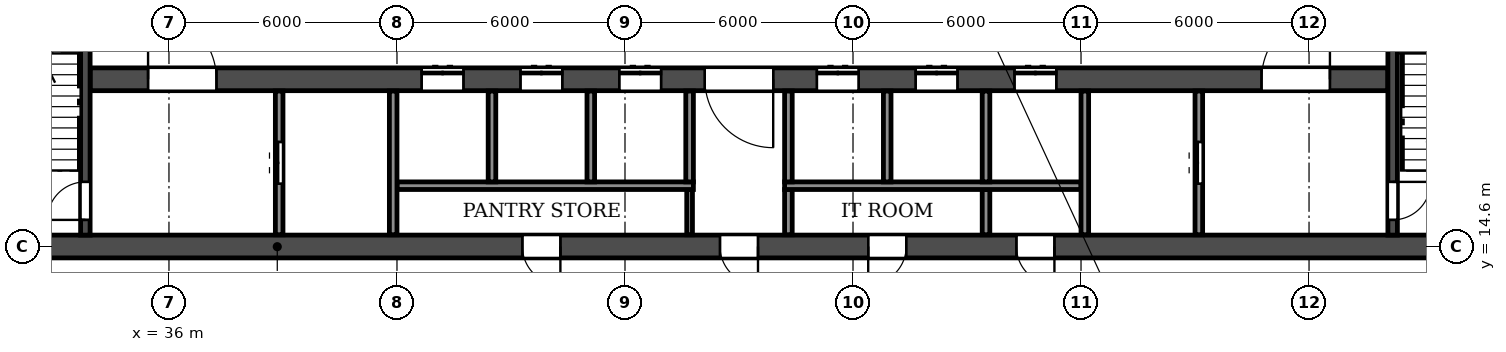
"""IFC4 building model, lengths in metres.
Left out: names, types, materials, properties, quantities, classifications, styles, units other than length and angle.
Written with IfcOpenShell. Run it as: python <this file> out.ifc"""

import sys

from ifc_helpers import new_model, si_unit, direction, frame, frame_2d, origin, place, context, subcontext, project, spatial, rectangle, extrude, element, fill, save


model = new_model("IFC4")
c1 = context("Model", 3, precision=1e-05, world=origin(), true_north=direction((0.0, 1.0)))
c2 = subcontext(c1, "Body", "Model", "MODEL_VIEW")
j1 = project(units=[si_unit("LENGTHUNIT", "METRE"), si_unit("PLANEANGLEUNIT", "RADIAN")], contexts=[c1])
p1 = place(None, origin())
s1 = spatial("IfcSite", under=j1, at=p1, CompositionType="ELEMENT")
p2 = place(p1, origin())
s2 = spatial("IfcBuilding", under=s1, at=p2, CompositionType="ELEMENT")
p3 = place(p2, frame((0.0, 0.0, 43.2)))
s3 = spatial("IfcBuildingStorey", under=s2, at=p3, CompositionType="ELEMENT", Elevation=43.2)
p4 = place(p3, frame((2.6, 14.6, 0.0), z_axis=(0.0, 0.0, 1.0), x_axis=(1.0, 0.0, 0.0)))
e1 = element("IfcWall", 1, at=p4, inside=s3, PredefinedType="SOLIDWALL", context=c2, shape_type="SweptSolid", body=[
    extrude(rectangle(XDim=96.8, YDim=0.6, at=frame_2d((48.4, 0.0))), origin(), (0.0, 0.0, 1.0), 3.05),
])
p5 = place(p4, frame((3.05, 0.0, 0.0)))
e2 = element("IfcOpeningElement", 2, at=p5, cuts=e1, PredefinedType="OPENING", context=c2, shape_type="SweptSolid", body=[
    extrude(rectangle(XDim=1.5, YDim=2.1, at=frame_2d((0.75, 1.05))), frame((0.0, 0.31, 0.0), z_axis=(0.0, -1.0, 0.0), x_axis=(1.0, 0.0, 0.0)), (0.0, 0.0, 1.0), 0.62),
])
p6 = place(p4, frame((10.75, 0.0, 0.0)))
e3 = element("IfcOpeningElement", 3, at=p6, cuts=e1, PredefinedType="OPENING", context=c2, shape_type="SweptSolid", body=[
    extrude(rectangle(XDim=1.5, YDim=2.1, at=frame_2d((0.75, 1.05))), frame((0.0, 0.31, 0.0), z_axis=(0.0, -1.0, 0.0), x_axis=(1.0, 0.0, 0.0)), (0.0, 0.0, 1.0), 0.62),
])
p7 = place(p4, frame((16.3, 0.0, 0.0)))
e4 = element("IfcOpeningElement", 4, at=p7, cuts=e1, PredefinedType="OPENING", context=c2, shape_type="SweptSolid", body=[
    extrude(rectangle(XDim=1.0, YDim=2.1, at=frame_2d((0.5, 1.05))), frame((0.0, 0.31, 0.0), z_axis=(0.0, -1.0, 0.0), x_axis=(1.0, 0.0, 0.0)), (0.0, 0.0, 1.0), 0.62),
])
p8 = place(p4, frame((24.2, 0.0, 0.0)))
e5 = element("IfcOpeningElement", 5, at=p8, cuts=e1, PredefinedType="OPENING", context=c2, shape_type="SweptSolid", body=[
    extrude(rectangle(XDim=1.0, YDim=2.1, at=frame_2d((0.5, 1.05))), frame((0.0, 0.31, 0.0), z_axis=(0.0, -1.0, 0.0), x_axis=(1.0, 0.0, 0.0)), (0.0, 0.0, 1.0), 0.62),
])
p9 = place(p4, frame((28.8, 0.0, 0.0)))
e6 = element("IfcOpeningElement", 6, at=p9, cuts=e1, PredefinedType="OPENING", context=c2, shape_type="SweptSolid", body=[
    extrude(rectangle(XDim=1.0, YDim=2.1, at=frame_2d((0.5, 1.05))), frame((0.0, 0.31, 0.0), z_axis=(0.0, -1.0, 0.0), x_axis=(1.0, 0.0, 0.0)), (0.0, 0.0, 1.0), 0.62),
])
p10 = place(p4, frame((42.7, 0.0, 0.0)))
e7 = element("IfcOpeningElement", 7, at=p10, cuts=e1, PredefinedType="OPENING", context=c2, shape_type="SweptSolid", body=[
    extrude(rectangle(XDim=1.0, YDim=2.1, at=frame_2d((0.5, 1.05))), frame((0.0, 0.31, 0.0), z_axis=(0.0, -1.0, 0.0), x_axis=(1.0, 0.0, 0.0)), (0.0, 0.0, 1.0), 0.62),
])
p11 = place(p4, frame((47.9, 0.0, 0.0)))
e8 = element("IfcOpeningElement", 8, at=p11, cuts=e1, PredefinedType="OPENING", context=c2, shape_type="SweptSolid", body=[
    extrude(rectangle(XDim=1.0, YDim=2.1, at=frame_2d((0.5, 1.05))), frame((0.0, 0.31, 0.0), z_axis=(0.0, -1.0, 0.0), x_axis=(1.0, 0.0, 0.0)), (0.0, 0.0, 1.0), 0.62),
])
p12 = place(p4, frame((51.8, 0.0, 0.0)))
e9 = element("IfcOpeningElement", 9, at=p12, cuts=e1, PredefinedType="OPENING", context=c2, shape_type="SweptSolid", body=[
    extrude(rectangle(XDim=1.0, YDim=2.1, at=frame_2d((0.5, 1.05))), frame((0.0, 0.31, 0.0), z_axis=(0.0, -1.0, 0.0), x_axis=(1.0, 0.0, 0.0)), (0.0, 0.0, 1.0), 0.62),
])
p13 = place(p4, frame((55.7, 0.0, 0.0)))
e10 = element("IfcOpeningElement", 10, at=p13, cuts=e1, PredefinedType="OPENING", context=c2, shape_type="SweptSolid", body=[
    extrude(rectangle(XDim=1.0, YDim=2.1, at=frame_2d((0.5, 1.05))), frame((0.0, 0.31, 0.0), z_axis=(0.0, -1.0, 0.0), x_axis=(1.0, 0.0, 0.0)), (0.0, 0.0, 1.0), 0.62),
])
p14 = place(p4, frame((67.0, 0.0, 0.0)))
e11 = element("IfcOpeningElement", 11, at=p14, cuts=e1, PredefinedType="OPENING", context=c2, shape_type="SweptSolid", body=[
    extrude(rectangle(XDim=1.0, YDim=2.1, at=frame_2d((0.5, 1.05))), frame((0.0, 0.31, 0.0), z_axis=(0.0, -1.0, 0.0), x_axis=(1.0, 0.0, 0.0)), (0.0, 0.0, 1.0), 0.62),
])
p15 = place(p4, frame((71.6, 0.0, 0.0)))
e12 = element("IfcOpeningElement", 12, at=p15, cuts=e1, PredefinedType="OPENING", context=c2, shape_type="SweptSolid", body=[
    extrude(rectangle(XDim=1.0, YDim=2.1, at=frame_2d((0.5, 1.05))), frame((0.0, 0.31, 0.0), z_axis=(0.0, -1.0, 0.0), x_axis=(1.0, 0.0, 0.0)), (0.0, 0.0, 1.0), 0.62),
])
p16 = place(p4, frame((79.5, 0.0, 0.0)))
e13 = element("IfcOpeningElement", 13, at=p16, cuts=e1, PredefinedType="OPENING", context=c2, shape_type="SweptSolid", body=[
    extrude(rectangle(XDim=1.0, YDim=2.1, at=frame_2d((0.5, 1.05))), frame((0.0, 0.31, 0.0), z_axis=(0.0, -1.0, 0.0), x_axis=(1.0, 0.0, 0.0)), (0.0, 0.0, 1.0), 0.62),
])
p17 = place(p4, frame((84.05, 0.0, 0.0)))
e14 = element("IfcOpeningElement", 14, at=p17, cuts=e1, PredefinedType="OPENING", context=c2, shape_type="SweptSolid", body=[
    extrude(rectangle(XDim=1.0, YDim=2.1, at=frame_2d((0.5, 1.05))), frame((0.0, 0.31, 0.0), z_axis=(0.0, -1.0, 0.0), x_axis=(1.0, 0.0, 0.0)), (0.0, 0.0, 1.0), 0.62),
])
p18 = place(p4, frame((91.75, 0.0, 0.0)))
e15 = element("IfcOpeningElement", 15, at=p18, cuts=e1, PredefinedType="OPENING", context=c2, shape_type="SweptSolid", body=[
    extrude(rectangle(XDim=1.0, YDim=2.1, at=frame_2d((0.5, 1.05))), frame((0.0, 0.31, 0.0), z_axis=(0.0, -1.0, 0.0), x_axis=(1.0, 0.0, 0.0)), (0.0, 0.0, 1.0), 0.62),
])
p19 = place(p3, frame((33.925, 19.0, 0.0), z_axis=(0.0, 0.0, 1.0), x_axis=(1.0, 0.0, 0.0)))
e16 = element("IfcWall", 16, at=p19, inside=s3, PredefinedType="SOLIDWALL", context=c2, shape_type="SweptSolid", body=[
    extrude(rectangle(XDim=34.15, YDim=0.6, at=frame_2d((17.075, 0.0))), origin(), (0.0, 0.0, 1.0), 3.05),
])
p20 = place(p19, frame((16.175, 0.0, 0.0)))
e17 = element("IfcOpeningElement", 17, at=p20, cuts=e16, PredefinedType="OPENING", context=c2, shape_type="SweptSolid", body=[
    extrude(rectangle(XDim=1.8, YDim=2.1, at=frame_2d((0.9, 1.05))), frame((0.0, 0.31, 0.0), z_axis=(0.0, -1.0, 0.0), x_axis=(1.0, 0.0, 0.0)), (0.0, 0.0, 1.0), 0.62),
])
p21 = place(p19, frame((1.525, 0.0, 0.0)))
e18 = element("IfcOpeningElement", 18, at=p21, cuts=e16, PredefinedType="OPENING", context=c2, shape_type="SweptSolid", body=[
    extrude(rectangle(XDim=1.8, YDim=2.1, at=frame_2d((0.9, 1.05))), frame((0.0, 0.31, 0.0), z_axis=(0.0, -1.0, 0.0), x_axis=(1.0, 0.0, 0.0)), (0.0, 0.0, 1.0), 0.62),
])
p22 = place(p19, frame((8.725, 0.0, 0.0)))
e19 = element("IfcOpeningElement", 19, at=p22, cuts=e16, PredefinedType="OPENING", context=c2, shape_type="SweptSolid", body=[
    extrude(rectangle(XDim=1.1, YDim=2.1, at=frame_2d((0.55, 1.05))), frame((0.0, 0.31, 0.0), z_axis=(0.0, -1.0, 0.0), x_axis=(1.0, 0.0, 0.0)), (0.0, 0.0, 1.0), 0.62),
])
p23 = place(p19, frame((11.325, 0.0, 0.0)))
e20 = element("IfcOpeningElement", 20, at=p23, cuts=e16, PredefinedType="OPENING", context=c2, shape_type="SweptSolid", body=[
    extrude(rectangle(XDim=1.1, YDim=2.1, at=frame_2d((0.55, 1.05))), frame((0.0, 0.31, 0.0), z_axis=(0.0, -1.0, 0.0), x_axis=(1.0, 0.0, 0.0)), (0.0, 0.0, 1.0), 0.62),
])
p24 = place(p19, frame((13.925, 0.0, 0.0)))
e21 = element("IfcOpeningElement", 21, at=p24, cuts=e16, PredefinedType="OPENING", context=c2, shape_type="SweptSolid", body=[
    extrude(rectangle(XDim=1.1, YDim=2.1, at=frame_2d((0.55, 1.05))), frame((0.0, 0.31, 0.0), z_axis=(0.0, -1.0, 0.0), x_axis=(1.0, 0.0, 0.0)), (0.0, 0.0, 1.0), 0.62),
])
p25 = place(p19, frame((19.125, 0.0, 0.0)))
e22 = element("IfcOpeningElement", 22, at=p25, cuts=e16, PredefinedType="OPENING", context=c2, shape_type="SweptSolid", body=[
    extrude(rectangle(XDim=1.1, YDim=2.1, at=frame_2d((0.55, 1.05))), frame((0.0, 0.31, 0.0), z_axis=(0.0, -1.0, 0.0), x_axis=(1.0, 0.0, 0.0)), (0.0, 0.0, 1.0), 0.62),
])
p26 = place(p19, frame((21.725, 0.0, 0.0)))
e23 = element("IfcOpeningElement", 23, at=p26, cuts=e16, PredefinedType="OPENING", context=c2, shape_type="SweptSolid", body=[
    extrude(rectangle(XDim=1.1, YDim=2.1, at=frame_2d((0.55, 1.05))), frame((0.0, 0.31, 0.0), z_axis=(0.0, -1.0, 0.0), x_axis=(1.0, 0.0, 0.0)), (0.0, 0.0, 1.0), 0.62),
])
p27 = place(p19, frame((24.325, 0.0, 0.0)))
e24 = element("IfcOpeningElement", 24, at=p27, cuts=e16, PredefinedType="OPENING", context=c2, shape_type="SweptSolid", body=[
    extrude(rectangle(XDim=1.1, YDim=2.1, at=frame_2d((0.55, 1.05))), frame((0.0, 0.31, 0.0), z_axis=(0.0, -1.0, 0.0), x_axis=(1.0, 0.0, 0.0)), (0.0, 0.0, 1.0), 0.62),
])
p28 = place(p19, frame((30.825, 0.0, 0.0)))
e25 = element("IfcOpeningElement", 25, at=p28, cuts=e16, PredefinedType="OPENING", context=c2, shape_type="SweptSolid", body=[
    extrude(rectangle(XDim=1.8, YDim=2.1, at=frame_2d((0.9, 1.05))), frame((0.0, 0.31, 0.0), z_axis=(0.0, -1.0, 0.0), x_axis=(1.0, 0.0, 0.0)), (0.0, 0.0, 1.0), 0.62),
])
p29 = place(p3, frame((33.8, 14.9, 0.0), z_axis=(0.0, 0.0, 1.0), x_axis=(0.0, 1.0, 0.0)))
e26 = element("IfcWall", 26, at=p29, inside=s3, PredefinedType="SOLIDWALL", context=c2, shape_type="SweptSolid", body=[
    extrude(rectangle(XDim=7.575, YDim=0.25, at=frame_2d((3.788, 0.0))), origin(), (0.0, 0.0, 1.0), 3.05),
])
p30 = place(p29, frame((0.4, 0.0, 0.0)))
e27 = element("IfcOpeningElement", 27, at=p30, cuts=e26, PredefinedType="OPENING", context=c2, shape_type="SweptSolid", body=[
    extrude(rectangle(XDim=1.0, YDim=2.1, at=frame_2d((0.5, 1.05))), frame((0.0, 0.135, 0.0), z_axis=(0.0, -1.0, 0.0), x_axis=(1.0, 0.0, 0.0)), (0.0, 0.0, 1.0), 0.27),
])
p31 = place(p3, frame((68.2, 14.9, 0.0), z_axis=(0.0, 0.0, 1.0), x_axis=(0.0, 1.0, 0.0)))
e28 = element("IfcWall", 28, at=p31, inside=s3, PredefinedType="SOLIDWALL", context=c2, shape_type="SweptSolid", body=[
    extrude(rectangle(XDim=7.575, YDim=0.25, at=frame_2d((3.788, 0.0))), origin(), (0.0, 0.0, 1.0), 3.05),
])
p32 = place(p31, frame((0.4, 0.0, 0.0)))
e29 = element("IfcOpeningElement", 29, at=p32, cuts=e28, PredefinedType="OPENING", context=c2, shape_type="SweptSolid", body=[
    extrude(rectangle(XDim=1.0, YDim=2.1, at=frame_2d((0.5, 1.05))), frame((0.0, 0.135, 0.0), z_axis=(0.0, -1.0, 0.0), x_axis=(1.0, 0.0, 0.0)), (0.0, 0.0, 1.0), 0.27),
])
p33 = place(p3, frame((49.7, 14.91, 0.0), z_axis=(0.0, 0.0, 1.0), x_axis=(0.0, 1.0, 0.0)))
e30 = element("IfcWall", 30, at=p33, inside=s3, PredefinedType="PARTITIONING", context=c2, shape_type="SweptSolid", body=[
    extrude(rectangle(XDim=1.19, YDim=0.15, at=frame_2d((0.595, 0.0))), origin(), (0.0, 0.0, 1.0), 3.05),
])
for number, where, z_axis, x_axis in (
    (31, (52.3, 14.91, 0.0), (0.0, 0.0, 1.0), (0.0, 1.0, 0.0)),
    (32, (57.5, 14.91, 0.0), (0.0, 0.0, 1.0), (0.0, 1.0, 0.0)),
):
    element("IfcWall", number, at=place(p3, frame(where, z_axis=z_axis, x_axis=x_axis)), inside=s3, PredefinedType="PARTITIONING", context=c2, shape_type="SweptSolid", body=[
        extrude(rectangle(XDim=1.19, YDim=0.2, at=frame_2d((0.595, 0.0))), origin(), (0.0, 0.0, 1.0), 3.05),
    ])
for number, where, z_axis, x_axis in (
    (33, (42.0, 16.2, 0.0), (0.0, 0.0, 1.0), (1.0, 0.0, 0.0)),
    (34, (52.2, 16.2, 0.0), (0.0, 0.0, 1.0), (1.0, 0.0, 0.0)),
):
    element("IfcWall", number, at=place(p3, frame(where, z_axis=z_axis, x_axis=x_axis)), inside=s3, PredefinedType="PARTITIONING", context=c2, shape_type="SweptSolid", body=[
        extrude(rectangle(XDim=7.8, YDim=0.2, at=frame_2d((3.9, 0.0))), origin(), (0.0, 0.0, 1.0), 3.05),
    ])
p34 = place(p3, frame((38.9, 14.91, 0.0), z_axis=(0.0, 0.0, 1.0), x_axis=(0.0, 1.0, 0.0)))
e35 = element("IfcWall", 35, at=p34, inside=s3, PredefinedType="PARTITIONING", context=c2, shape_type="SweptSolid", body=[
    extrude(rectangle(XDim=3.78, YDim=0.2, at=frame_2d((1.89, 0.0))), origin(), (0.0, 0.0, 1.0), 3.05),
])
p35 = place(p34, frame((1.34, 0.0, 0.0)))
e36 = element("IfcOpeningElement", 36, at=p35, cuts=e35, PredefinedType="OPENING", context=c2, shape_type="SweptSolid", body=[
    extrude(rectangle(XDim=1.1, YDim=2.1, at=frame_2d((0.55, 1.05))), frame((0.0, 0.11, 0.0), z_axis=(0.0, -1.0, 0.0), x_axis=(1.0, 0.0, 0.0)), (0.0, 0.0, 1.0), 0.22),
])
p36 = place(p3, frame((41.9, 14.91, 0.0), z_axis=(0.0, 0.0, 1.0), x_axis=(0.0, 1.0, 0.0)))
e37 = element("IfcWall", 37, at=p36, inside=s3, PredefinedType="PARTITIONING", context=c2, shape_type="SweptSolid", body=[
    extrude(rectangle(XDim=3.78, YDim=0.2, at=frame_2d((1.89, 0.0))), origin(), (0.0, 0.0, 1.0), 3.05),
])
for number, where, z_axis, x_axis in (
    (38, (44.5, 16.3, 0.0), (0.0, 0.0, 1.0), (0.0, 1.0, 0.0)),
    (39, (47.1, 16.3, 0.0), (0.0, 0.0, 1.0), (0.0, 1.0, 0.0)),
    (40, (49.7, 16.3, 0.0), (0.0, 0.0, 1.0), (0.0, 1.0, 0.0)),
    (41, (52.3, 16.3, 0.0), (0.0, 0.0, 1.0), (0.0, 1.0, 0.0)),
    (42, (54.9, 16.3, 0.0), (0.0, 0.0, 1.0), (0.0, 1.0, 0.0)),
    (43, (57.5, 16.3, 0.0), (0.0, 0.0, 1.0), (0.0, 1.0, 0.0)),
):
    element("IfcWall", number, at=place(p3, frame(where, z_axis=z_axis, x_axis=x_axis)), inside=s3, PredefinedType="PARTITIONING", context=c2, shape_type="SweptSolid", body=[
        extrude(rectangle(XDim=2.39, YDim=0.2, at=frame_2d((1.195, 0.0))), origin(), (0.0, 0.0, 1.0), 3.05),
    ])
p37 = place(p3, frame((60.1, 14.91, 0.0), z_axis=(0.0, 0.0, 1.0), x_axis=(0.0, 1.0, 0.0)))
e44 = element("IfcWall", 44, at=p37, inside=s3, PredefinedType="PARTITIONING", context=c2, shape_type="SweptSolid", body=[
    extrude(rectangle(XDim=3.78, YDim=0.2, at=frame_2d((1.89, 0.0))), origin(), (0.0, 0.0, 1.0), 3.05),
])
p38 = place(p3, frame((63.1, 14.91, 0.0), z_axis=(0.0, 0.0, 1.0), x_axis=(0.0, 1.0, 0.0)))
e45 = element("IfcWall", 45, at=p38, inside=s3, PredefinedType="PARTITIONING", context=c2, shape_type="SweptSolid", body=[
    extrude(rectangle(XDim=3.78, YDim=0.2, at=frame_2d((1.89, 0.0))), origin(), (0.0, 0.0, 1.0), 3.05),
])
p39 = place(p38, frame((1.34, 0.0, 0.0)))
e46 = element("IfcOpeningElement", 46, at=p39, cuts=e45, PredefinedType="OPENING", context=c2, shape_type="SweptSolid", body=[
    extrude(rectangle(XDim=1.1, YDim=2.1, at=frame_2d((0.55, 1.05))), frame((0.0, 0.11, 0.0), z_axis=(0.0, -1.0, 0.0), x_axis=(1.0, 0.0, 0.0)), (0.0, 0.0, 1.0), 0.22),
])
p40 = place(p10, frame((1.0, 0.0, 0.0), z_axis=(0.0, 0.0, 1.0), x_axis=(-1.0, 0.0, 0.0)))
e47 = element("IfcDoor", 47, at=p40, inside=s3, OperationType="SINGLE_SWING_LEFT", PredefinedType="DOOR", context=c2, shape_type="SweptSolid", body=[
    extrude(rectangle(XDim=1.0, YDim=2.1, at=frame_2d((0.5, 1.05))), frame((0.0, 0.025, 0.0), z_axis=(0.0, -1.0, 0.0), x_axis=(1.0, 0.0, 0.0)), (0.0, 0.0, 1.0), 0.05),
])
fill(e7, e47)
p41 = place(p11, frame((1.0, 0.0, 0.0), z_axis=(0.0, 0.0, 1.0), x_axis=(-1.0, 0.0, 0.0)))
e48 = element("IfcDoor", 48, at=p41, inside=s3, OperationType="SINGLE_SWING_LEFT", PredefinedType="DOOR", context=c2, shape_type="SweptSolid", body=[
    extrude(rectangle(XDim=1.0, YDim=2.1, at=frame_2d((0.5, 1.05))), frame((0.0, 0.025, 0.0), z_axis=(0.0, -1.0, 0.0), x_axis=(1.0, 0.0, 0.0)), (0.0, 0.0, 1.0), 0.05),
])
fill(e8, e48)
p42 = place(p12, frame((1.0, 0.0, 0.0), z_axis=(0.0, 0.0, 1.0), x_axis=(-1.0, 0.0, 0.0)))
e49 = element("IfcDoor", 49, at=p42, inside=s3, OperationType="SINGLE_SWING_RIGHT", PredefinedType="DOOR", context=c2, shape_type="SweptSolid", body=[
    extrude(rectangle(XDim=1.0, YDim=2.1, at=frame_2d((0.5, 1.05))), frame((0.0, 0.025, 0.0), z_axis=(0.0, -1.0, 0.0), x_axis=(1.0, 0.0, 0.0)), (0.0, 0.0, 1.0), 0.05),
])
fill(e9, e49)
p43 = place(p13, frame((1.0, 0.0, 0.0), z_axis=(0.0, 0.0, 1.0), x_axis=(-1.0, 0.0, 0.0)))
e50 = element("IfcDoor", 50, at=p43, inside=s3, OperationType="SINGLE_SWING_LEFT", PredefinedType="DOOR", context=c2, shape_type="SweptSolid", body=[
    extrude(rectangle(XDim=1.0, YDim=2.1, at=frame_2d((0.5, 1.05))), frame((0.0, 0.025, 0.0), z_axis=(0.0, -1.0, 0.0), x_axis=(1.0, 0.0, 0.0)), (0.0, 0.0, 1.0), 0.05),
])
fill(e10, e50)
p44 = place(p39, origin())
e51 = element("IfcDoor", 51, at=p44, inside=s3, OperationType="DOUBLE_DOOR_SLIDING", PredefinedType="DOOR", context=c2, shape_type="SweptSolid", body=[
    extrude(rectangle(XDim=1.1, YDim=2.1, at=frame_2d((0.55, 1.05))), frame((0.0, 0.025, 0.0), z_axis=(0.0, -1.0, 0.0), x_axis=(1.0, 0.0, 0.0)), (0.0, 0.0, 1.0), 0.05),
])
fill(e46, e51)
p45 = place(p32, frame((1.0, 0.0, 0.0), z_axis=(0.0, 0.0, 1.0), x_axis=(-1.0, 0.0, 0.0)))
e52 = element("IfcDoor", 52, at=p45, inside=s3, OperationType="SINGLE_SWING_LEFT", PredefinedType="DOOR", context=c2, shape_type="SweptSolid", body=[
    extrude(rectangle(XDim=1.0, YDim=2.1, at=frame_2d((0.5, 1.05))), frame((0.0, 0.025, 0.0), z_axis=(0.0, -1.0, 0.0), x_axis=(1.0, 0.0, 0.0)), (0.0, 0.0, 1.0), 0.05),
])
fill(e29, e52)
p46 = place(p30, origin())
e53 = element("IfcDoor", 53, at=p46, inside=s3, OperationType="SINGLE_SWING_LEFT", PredefinedType="DOOR", context=c2, shape_type="SweptSolid", body=[
    extrude(rectangle(XDim=1.0, YDim=2.1, at=frame_2d((0.5, 1.05))), frame((0.0, 0.025, 0.0), z_axis=(0.0, -1.0, 0.0), x_axis=(1.0, 0.0, 0.0)), (0.0, 0.0, 1.0), 0.05),
])
fill(e27, e53)
p47 = place(p35, origin())
e54 = element("IfcDoor", 54, at=p47, inside=s3, OperationType="DOUBLE_DOOR_SLIDING", PredefinedType="DOOR", context=c2, shape_type="SweptSolid", body=[
    extrude(rectangle(XDim=1.1, YDim=2.1, at=frame_2d((0.55, 1.05))), frame((0.0, 0.025, 0.0), z_axis=(0.0, -1.0, 0.0), x_axis=(1.0, 0.0, 0.0)), (0.0, 0.0, 1.0), 0.05),
])
fill(e36, e54)
p48 = place(p20, frame((1.8, 0.0, 0.0), z_axis=(0.0, 0.0, 1.0), x_axis=(-1.0, 0.0, 0.0)))
e55 = element("IfcDoor", 55, at=p48, inside=s3, OperationType="DOUBLE_DOOR_SINGLE_SWING", PredefinedType="DOOR", context=c2, shape_type="SweptSolid", body=[
    extrude(rectangle(XDim=1.8, YDim=2.1, at=frame_2d((0.9, 1.05))), frame((0.0, 0.025, 0.0), z_axis=(0.0, -1.0, 0.0), x_axis=(1.0, 0.0, 0.0)), (0.0, 0.0, 1.0), 0.05),
])
fill(e17, e55)
p49 = place(p21, origin())
e56 = element("IfcDoor", 56, at=p49, inside=s3, OperationType="DOUBLE_DOOR_SINGLE_SWING", PredefinedType="DOOR", context=c2, shape_type="SweptSolid", body=[
    extrude(rectangle(XDim=1.8, YDim=2.1, at=frame_2d((0.9, 1.05))), frame((0.0, 0.025, 0.0), z_axis=(0.0, -1.0, 0.0), x_axis=(1.0, 0.0, 0.0)), (0.0, 0.0, 1.0), 0.05),
])
fill(e18, e56)
p50 = place(p22, origin())
e57 = element("IfcDoor", 57, at=p50, inside=s3, OperationType="DOUBLE_DOOR_SLIDING", PredefinedType="DOOR", context=c2, shape_type="SweptSolid", body=[
    extrude(rectangle(XDim=1.1, YDim=2.1, at=frame_2d((0.55, 1.05))), frame((0.0, 0.025, 0.0), z_axis=(0.0, -1.0, 0.0), x_axis=(1.0, 0.0, 0.0)), (0.0, 0.0, 1.0), 0.05),
])
fill(e19, e57)
p51 = place(p23, origin())
e58 = element("IfcDoor", 58, at=p51, inside=s3, OperationType="DOUBLE_DOOR_SLIDING", PredefinedType="DOOR", context=c2, shape_type="SweptSolid", body=[
    extrude(rectangle(XDim=1.1, YDim=2.1, at=frame_2d((0.55, 1.05))), frame((0.0, 0.025, 0.0), z_axis=(0.0, -1.0, 0.0), x_axis=(1.0, 0.0, 0.0)), (0.0, 0.0, 1.0), 0.05),
])
fill(e20, e58)
p52 = place(p24, origin())
e59 = element("IfcDoor", 59, at=p52, inside=s3, OperationType="DOUBLE_DOOR_SLIDING", PredefinedType="DOOR", context=c2, shape_type="SweptSolid", body=[
    extrude(rectangle(XDim=1.1, YDim=2.1, at=frame_2d((0.55, 1.05))), frame((0.0, 0.025, 0.0), z_axis=(0.0, -1.0, 0.0), x_axis=(1.0, 0.0, 0.0)), (0.0, 0.0, 1.0), 0.05),
])
fill(e21, e59)
p53 = place(p25, origin())
e60 = element("IfcDoor", 60, at=p53, inside=s3, OperationType="DOUBLE_DOOR_SLIDING", PredefinedType="DOOR", context=c2, shape_type="SweptSolid", body=[
    extrude(rectangle(XDim=1.1, YDim=2.1, at=frame_2d((0.55, 1.05))), frame((0.0, 0.025, 0.0), z_axis=(0.0, -1.0, 0.0), x_axis=(1.0, 0.0, 0.0)), (0.0, 0.0, 1.0), 0.05),
])
fill(e22, e60)
p54 = place(p26, origin())
e61 = element("IfcDoor", 61, at=p54, inside=s3, OperationType="DOUBLE_DOOR_SLIDING", PredefinedType="DOOR", context=c2, shape_type="SweptSolid", body=[
    extrude(rectangle(XDim=1.1, YDim=2.1, at=frame_2d((0.55, 1.05))), frame((0.0, 0.025, 0.0), z_axis=(0.0, -1.0, 0.0), x_axis=(1.0, 0.0, 0.0)), (0.0, 0.0, 1.0), 0.05),
])
fill(e23, e61)
p55 = place(p27, origin())
e62 = element("IfcDoor", 62, at=p55, inside=s3, OperationType="DOUBLE_DOOR_SLIDING", PredefinedType="DOOR", context=c2, shape_type="SweptSolid", body=[
    extrude(rectangle(XDim=1.1, YDim=2.1, at=frame_2d((0.55, 1.05))), frame((0.0, 0.025, 0.0), z_axis=(0.0, -1.0, 0.0), x_axis=(1.0, 0.0, 0.0)), (0.0, 0.0, 1.0), 0.05),
])
fill(e24, e62)
p56 = place(p28, origin())
e63 = element("IfcDoor", 63, at=p56, inside=s3, OperationType="DOUBLE_DOOR_SINGLE_SWING", PredefinedType="DOOR", context=c2, shape_type="SweptSolid", body=[
    extrude(rectangle(XDim=1.8, YDim=2.1, at=frame_2d((0.9, 1.05))), frame((0.0, 0.025, 0.0), z_axis=(0.0, -1.0, 0.0), x_axis=(1.0, 0.0, 0.0)), (0.0, 0.0, 1.0), 0.05),
])
fill(e25, e63)
save(model, sys.argv[1])
